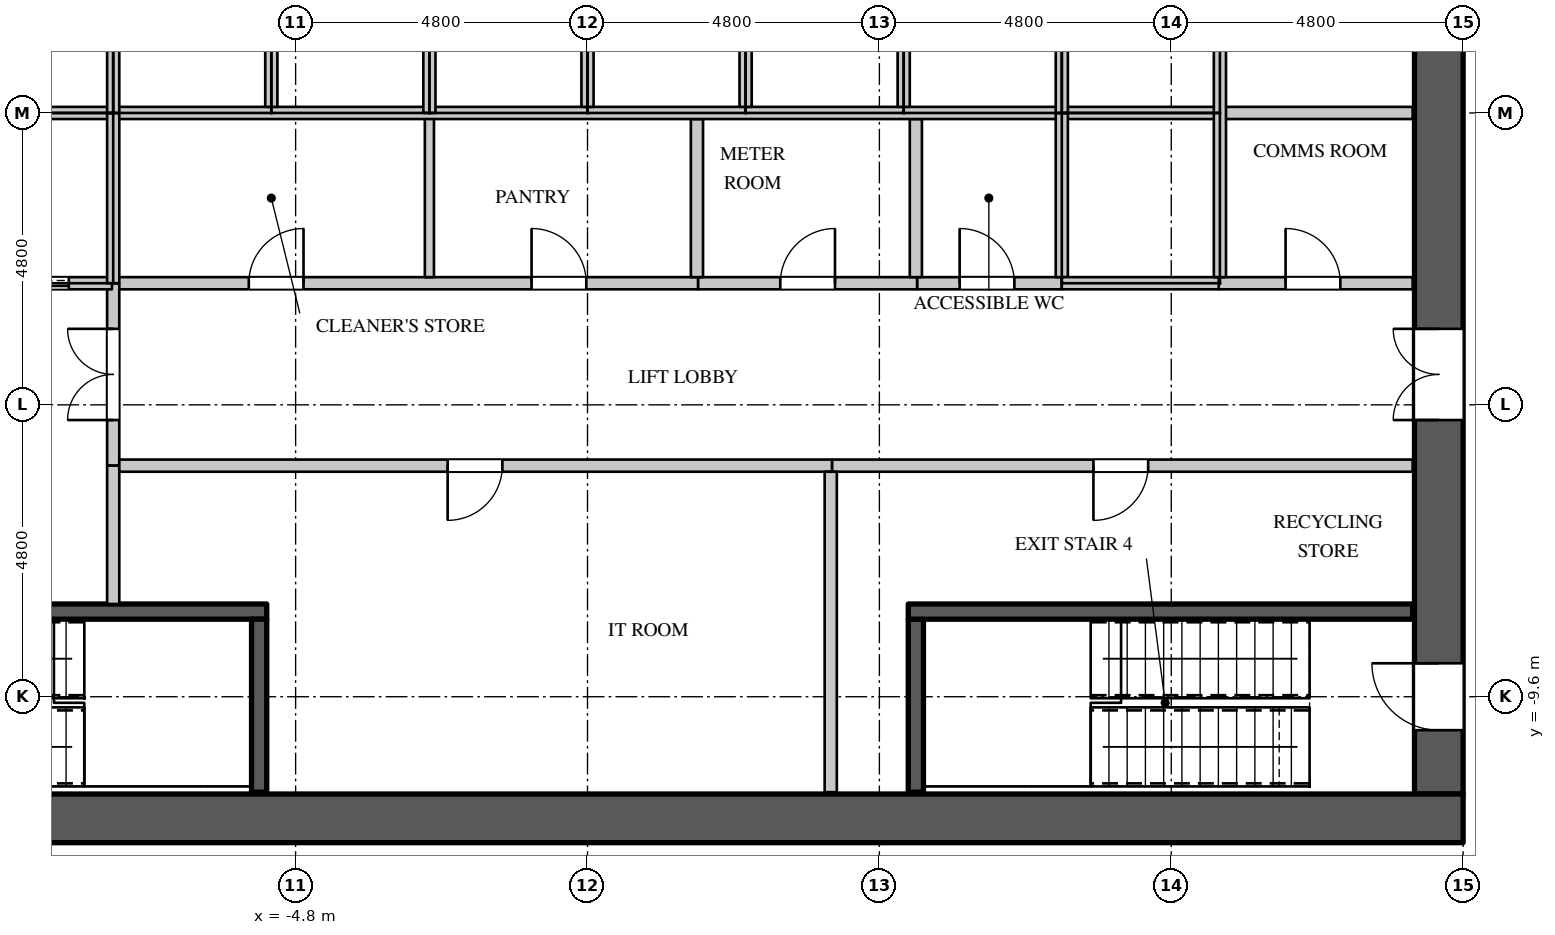
"""IFC4 building model, lengths in metres.
Left out: names, types, materials, properties, quantities, classifications, styles, units other than length and angle.
Written with IfcOpenShell. Run it as: python <this file> out.ifc"""

import sys

from ifc_helpers import new_model, si_unit, direction, frame, frame_2d, origin, place, context, subcontext, project, spatial, rectangle, extrude, element, fill, save


model = new_model("IFC4")
c1 = context("Model", 3, precision=1e-05, world=origin(), true_north=direction((0.0, 1.0)))
c2 = subcontext(c1, "Body", "Model", "MODEL_VIEW")
j1 = project(units=[si_unit("LENGTHUNIT", "METRE"), si_unit("PLANEANGLEUNIT", "RADIAN")], contexts=[c1])
p1 = place(None, origin())
s1 = spatial("IfcSite", under=j1, at=p1, CompositionType="ELEMENT")
p2 = place(p1, origin())
s2 = spatial("IfcBuilding", under=s1, at=p2, CompositionType="ELEMENT")
p3 = place(p2, frame((0.0, 0.0, 144.3)))
s3 = spatial("IfcBuildingStorey", under=s2, at=p3, CompositionType="ELEMENT", Elevation=144.3)
p4 = place(p3, frame((-14.4, -11.6, 0.0), z_axis=(0.0, 0.0, 1.0), x_axis=(1.0, 0.0, 0.0)))
e1 = element("IfcWall", 1, at=p4, inside=s3, PredefinedType="SHEAR", context=c2, shape_type="SweptSolid", body=[
    extrude(rectangle(XDim=28.8, YDim=0.8, at=frame_2d((14.4, 0.0))), origin(), (0.0, 0.0, 1.0), 4.2),
])
p5 = place(p3, frame((14.0, -11.2, 0.0), z_axis=(0.0, 0.0, 1.0), x_axis=(0.0, 1.0, 0.0)))
e2 = element("IfcWall", 2, at=p5, inside=s3, PredefinedType="SHEAR", context=c2, shape_type="SweptSolid", body=[
    extrude(rectangle(XDim=22.4, YDim=0.8, at=frame_2d((11.2, 0.0))), origin(), (0.0, 0.0, 1.0), 4.2),
])
p6 = place(p5, frame((20.25, 0.0, 0.0)))
e3 = element("IfcOpeningElement", 3, at=p6, cuts=e2, PredefinedType="OPENING", context=c2, shape_type="SweptSolid", body=[
    extrude(rectangle(XDim=1.1, YDim=2.2, at=frame_2d((0.55, 1.1))), frame((0.0, 0.41, 0.0), z_axis=(0.0, -1.0, 0.0), x_axis=(1.0, 0.0, 0.0)), (0.0, 0.0, 1.0), 0.82),
])
p7 = place(p5, frame((1.05, 0.0, 0.0)))
e4 = element("IfcOpeningElement", 4, at=p7, cuts=e2, PredefinedType="OPENING", context=c2, shape_type="SweptSolid", body=[
    extrude(rectangle(XDim=1.1, YDim=2.2, at=frame_2d((0.55, 1.1))), frame((0.0, 0.41, 0.0), z_axis=(0.0, -1.0, 0.0), x_axis=(1.0, 0.0, 0.0)), (0.0, 0.0, 1.0), 0.82),
])
p8 = place(p5, frame((14.75, 0.0, 0.0)))
e5 = element("IfcOpeningElement", 5, at=p8, cuts=e2, PredefinedType="OPENING", context=c2, shape_type="SweptSolid", body=[
    extrude(rectangle(XDim=1.5, YDim=2.4, at=frame_2d((0.75, 1.2))), frame((0.0, 0.41, 0.0), z_axis=(0.0, -1.0, 0.0), x_axis=(1.0, 0.0, 0.0)), (0.0, 0.0, 1.0), 0.82),
])
p9 = place(p5, frame((6.15, 0.0, 0.0)))
e6 = element("IfcOpeningElement", 6, at=p9, cuts=e2, PredefinedType="OPENING", context=c2, shape_type="SweptSolid", body=[
    extrude(rectangle(XDim=1.5, YDim=2.4, at=frame_2d((0.75, 1.2))), frame((0.0, 0.41, 0.0), z_axis=(0.0, -1.0, 0.0), x_axis=(1.0, 0.0, 0.0)), (0.0, 0.0, 1.0), 0.82),
])
p10 = place(p3, frame((-7.82, -2.8, 0.0), z_axis=(0.0, 0.0, 1.0), x_axis=(1.0, 0.0, 0.0)))
e7 = element("IfcWall", 7, at=p10, inside=s3, PredefinedType="PARTITIONING", context=c2, shape_type="SweptSolid", body=[
    extrude(rectangle(XDim=9.64, YDim=0.2, at=frame_2d((4.82, 0.0))), origin(), (0.0, 0.0, 1.0), 3.798),
])
p11 = place(p10, frame((2.25, 0.0, 0.0)))
e8 = element("IfcOpeningElement", 8, at=p11, cuts=e7, PredefinedType="OPENING", context=c2, shape_type="SweptSolid", body=[
    extrude(rectangle(XDim=0.9, YDim=2.2, at=frame_2d((0.45, 1.1))), frame((0.0, 0.11, 0.0), z_axis=(0.0, -1.0, 0.0), x_axis=(1.0, 0.0, 0.0)), (0.0, 0.0, 1.0), 0.22),
])
p12 = place(p10, frame((6.9, 0.0, 0.0)))
e9 = element("IfcOpeningElement", 9, at=p12, cuts=e7, PredefinedType="OPENING", context=c2, shape_type="SweptSolid", body=[
    extrude(rectangle(XDim=0.9, YDim=2.2, at=frame_2d((0.45, 1.1))), frame((0.0, 0.11, 0.0), z_axis=(0.0, -1.0, 0.0), x_axis=(1.0, 0.0, 0.0)), (0.0, 0.0, 1.0), 0.22),
])
p13 = place(p3, frame((-7.8, -5.8, 0.0), z_axis=(0.0, 0.0, 1.0), x_axis=(0.0, 1.0, 0.0)))
e10 = element("IfcWall", 10, at=p13, inside=s3, PredefinedType="PARTITIONING", context=c2, shape_type="SweptSolid", body=[
    extrude(rectangle(XDim=3.0, YDim=0.2, at=frame_2d((1.5, 0.0))), origin(), (0.0, 0.0, 1.0), 3.798),
])
p14 = place(p13, frame((0.75, 0.0, 0.0)))
e11 = element("IfcOpeningElement", 11, at=p14, cuts=e10, PredefinedType="OPENING", context=c2, shape_type="SweptSolid", body=[
    extrude(rectangle(XDim=1.5, YDim=2.4, at=frame_2d((0.75, 1.2))), frame((0.0, 0.11, 0.0), z_axis=(0.0, -1.0, 0.0), x_axis=(1.0, 0.0, 0.0)), (0.0, 0.0, 1.0), 0.22),
])
p15 = place(p3, frame((4.02, -5.8, 0.0), z_axis=(0.0, 0.0, 1.0), x_axis=(1.0, 0.0, 0.0)))
e12 = element("IfcWall", 12, at=p15, inside=s3, PredefinedType="PARTITIONING", context=c2, shape_type="SweptSolid", body=[
    extrude(rectangle(XDim=9.55, YDim=0.2, at=frame_2d((4.775, 0.0))), origin(), (0.0, 0.0, 1.0), 3.798),
])
p16 = place(p15, frame((4.3, 0.0, 0.0)))
e13 = element("IfcOpeningElement", 13, at=p16, cuts=e12, PredefinedType="OPENING", context=c2, shape_type="SweptSolid", body=[
    extrude(rectangle(XDim=0.9, YDim=2.2, at=frame_2d((0.45, 1.1))), frame((0.0, 0.11, 0.0), z_axis=(0.0, -1.0, 0.0), x_axis=(1.0, 0.0, 0.0)), (0.0, 0.0, 1.0), 0.22),
])
p17 = place(p3, frame((5.42, -2.8, 0.0), z_axis=(0.0, 0.0, 1.0), x_axis=(1.0, 0.0, 0.0)))
e14 = element("IfcWall", 14, at=p17, inside=s3, PredefinedType="PARTITIONING", context=c2, shape_type="SweptSolid", body=[
    extrude(rectangle(XDim=2.38, YDim=0.2, at=frame_2d((1.19, 0.0))), origin(), (0.0, 0.0, 1.0), 3.798),
])
p18 = place(p17, frame((0.7, 0.0, 0.0)))
e15 = element("IfcOpeningElement", 15, at=p18, cuts=e14, PredefinedType="OPENING", context=c2, shape_type="SweptSolid", body=[
    extrude(rectangle(XDim=0.9, YDim=2.2, at=frame_2d((0.45, 1.1))), frame((0.0, 0.11, 0.0), z_axis=(0.0, -1.0, 0.0), x_axis=(1.0, 0.0, 0.0)), (0.0, 0.0, 1.0), 0.22),
])
p19 = place(p3, frame((-2.6, -2.7, 0.0), z_axis=(0.0, 0.0, 1.0), x_axis=(0.0, 1.0, 0.0)))
e16 = element("IfcWall", 16, at=p19, inside=s3, PredefinedType="PARTITIONING", context=c2, shape_type="SweptSolid", body=[
    extrude(rectangle(XDim=2.7, YDim=0.15, at=frame_2d((1.35, 0.0))), origin(), (0.0, 0.0, 1.0), 3.798),
])
p20 = place(p3, frame((-7.8, -8.075, 0.0), z_axis=(0.0, 0.0, 1.0), x_axis=(0.0, 1.0, 0.0)))
e17 = element("IfcWall", 17, at=p20, inside=s3, PredefinedType="PARTITIONING", context=c2, shape_type="SweptSolid", body=[
    extrude(rectangle(XDim=2.275, YDim=0.2, at=frame_2d((1.137, 0.0))), origin(), (0.0, 0.0, 1.0), 3.798),
])
p21 = place(p3, frame((-7.7, -5.8, 0.0), z_axis=(0.0, 0.0, 1.0), x_axis=(1.0, 0.0, 0.0)))
e18 = element("IfcWall", 18, at=p21, inside=s3, PredefinedType="PARTITIONING", context=c2, shape_type="SweptSolid", body=[
    extrude(rectangle(XDim=11.72, YDim=0.2, at=frame_2d((5.86, 0.0))), origin(), (0.0, 0.0, 1.0), 3.798),
])
p22 = place(p21, frame((5.4, 0.0, 0.0)))
e19 = element("IfcOpeningElement", 19, at=p22, cuts=e18, PredefinedType="OPENING", context=c2, shape_type="SweptSolid", body=[
    extrude(rectangle(XDim=0.9, YDim=2.2, at=frame_2d((0.45, 1.1))), frame((0.0, 0.11, 0.0), z_axis=(0.0, -1.0, 0.0), x_axis=(1.0, 0.0, 0.0)), (0.0, 0.0, 1.0), 0.22),
])
p23 = place(p3, frame((1.82, -2.8, 0.0), z_axis=(0.0, 0.0, 1.0), x_axis=(1.0, 0.0, 0.0)))
e20 = element("IfcWall", 20, at=p23, inside=s3, PredefinedType="PARTITIONING", context=c2, shape_type="SweptSolid", body=[
    extrude(rectangle(XDim=3.6, YDim=0.2, at=frame_2d((1.8, 0.0))), origin(), (0.0, 0.0, 1.0), 3.798),
])
p24 = place(p23, frame((1.35, 0.0, 0.0)))
e21 = element("IfcOpeningElement", 21, at=p24, cuts=e20, PredefinedType="OPENING", context=c2, shape_type="SweptSolid", body=[
    extrude(rectangle(XDim=0.9, YDim=2.2, at=frame_2d((0.45, 1.1))), frame((0.0, 0.11, 0.0), z_axis=(0.0, -1.0, 0.0), x_axis=(1.0, 0.0, 0.0)), (0.0, 0.0, 1.0), 0.22),
])
p25 = place(p3, frame((1.8, -2.7, 0.0), z_axis=(0.0, 0.0, 1.0), x_axis=(0.0, 1.0, 0.0)))
e22 = element("IfcWall", 22, at=p25, inside=s3, PredefinedType="PARTITIONING", context=c2, shape_type="SweptSolid", body=[
    extrude(rectangle(XDim=2.6, YDim=0.2, at=frame_2d((1.3, 0.0))), origin(), (0.0, 0.0, 1.0), 3.798),
])
p26 = place(p3, frame((4.0, -11.17, 0.0), z_axis=(0.0, 0.0, 1.0), x_axis=(0.0, 1.0, 0.0)))
e23 = element("IfcWall", 23, at=p26, inside=s3, PredefinedType="PARTITIONING", context=c2, shape_type="SweptSolid", body=[
    extrude(rectangle(XDim=5.27, YDim=0.2, at=frame_2d((2.635, 0.0))), origin(), (0.0, 0.0, 1.0), 3.798),
])
p27 = place(p3, frame((5.4, -2.7, 0.0), z_axis=(0.0, 0.0, 1.0), x_axis=(0.0, 1.0, 0.0)))
e24 = element("IfcWall", 24, at=p27, inside=s3, PredefinedType="PARTITIONING", context=c2, shape_type="SweptSolid", body=[
    extrude(rectangle(XDim=2.6, YDim=0.2, at=frame_2d((1.3, 0.0))), origin(), (0.0, 0.0, 1.0), 3.798),
])
p28 = place(p3, frame((10.38, -2.8, 0.0), z_axis=(0.0, 0.0, 1.0), x_axis=(1.0, 0.0, 0.0)))
e25 = element("IfcWall", 25, at=p28, inside=s3, PredefinedType="PARTITIONING", context=c2, shape_type="SweptSolid", body=[
    extrude(rectangle(XDim=3.19, YDim=0.2, at=frame_2d((1.595, 0.0))), origin(), (0.0, 0.0, 1.0), 3.798),
])
p29 = place(p28, frame((1.1, 0.0, 0.0)))
e26 = element("IfcOpeningElement", 26, at=p29, cuts=e25, PredefinedType="OPENING", context=c2, shape_type="SweptSolid", body=[
    extrude(rectangle(XDim=0.9, YDim=2.2, at=frame_2d((0.45, 1.1))), frame((0.0, 0.11, 0.0), z_axis=(0.0, -1.0, 0.0), x_axis=(1.0, 0.0, 0.0)), (0.0, 0.0, 1.0), 0.22),
])
p30 = place(p3, frame((10.4, 0.0, 0.0), z_axis=(0.0, 0.0, 1.0), x_axis=(1.0, 0.0, 0.0)))
e27 = element("IfcWall", 27, at=p30, inside=s3, PredefinedType="PARTITIONING", context=c2, shape_type="SweptSolid", body=[
    extrude(rectangle(XDim=3.17, YDim=0.2, at=frame_2d((1.585, 0.0))), origin(), (0.0, 0.0, 1.0), 3.798),
])
p31 = place(p3, frame((-13.57, 0.0, 0.0), z_axis=(0.0, 0.0, 1.0), x_axis=(1.0, 0.0, 0.0)))
e28 = element("IfcWall", 28, at=p31, inside=s3, PredefinedType="PARTITIONING", context=c2, shape_type="SweptSolid", body=[
    extrude(rectangle(XDim=23.97, YDim=0.2, at=frame_2d((11.985, 0.0))), origin(), (0.0, 0.0, 1.0), 3.798),
])
p32 = place(p3, frame((-10.38, -2.8, 0.0), z_axis=(0.0, 0.0, 1.0), x_axis=(1.0, 0.0, 0.0)))
e29 = element("IfcWall", 29, at=p32, inside=s3, PredefinedType="PARTITIONING", context=c2, shape_type="SweptSolid", body=[
    extrude(rectangle(XDim=2.56, YDim=0.2, at=frame_2d((1.28, 0.0))), origin(), (0.0, 0.0, 1.0), 3.798),
])
p33 = place(p32, frame((0.75, 0.0, 0.0)))
e30 = element("IfcOpeningElement", 30, at=p33, cuts=e29, PredefinedType="OPENING", context=c2, shape_type="SweptSolid", body=[
    extrude(rectangle(XDim=1.1, YDim=2.2, at=frame_2d((0.55, 1.1))), frame((0.0, 0.11, 0.0), z_axis=(0.0, -1.0, 0.0), x_axis=(1.0, 0.0, 0.0)), (0.0, 0.0, 1.0), 0.22),
])
for number, where, z_axis, x_axis in (
    (31, (-7.8, -2.8, 0.0), (0.0, 0.0, 1.0), (0.0, 1.0, 0.0)),
    (32, (-7.8, 0.0, 0.0), (0.0, 0.0, 1.0), (0.0, 1.0, 0.0)),
):
    element("IfcWall", number, at=place(p3, frame(where, z_axis=z_axis, x_axis=x_axis)), inside=s3, PredefinedType="PARTITIONING", context=c2, shape_type="SweptSolid", body=[
        extrude(rectangle(XDim=2.8, YDim=0.2, at=frame_2d((1.4, 0.0))), origin(), (0.0, 0.0, 1.0), 3.798),
    ])
p34 = place(p3, frame((-5.2, 0.1, 0.0), z_axis=(0.0, 0.0, 1.0), x_axis=(0.0, 1.0, 0.0)))
e33 = element("IfcWall", 33, at=p34, inside=s3, PredefinedType="PARTITIONING", context=c2, shape_type="SweptSolid", body=[
    extrude(rectangle(XDim=2.6, YDim=0.2, at=frame_2d((1.3, 0.0))), origin(), (0.0, 0.0, 1.0), 3.798),
])
p35 = place(p3, frame((-2.6, 0.0, 0.0), z_axis=(0.0, 0.0, 1.0), x_axis=(0.0, 1.0, 0.0)))
e34 = element("IfcWall", 34, at=p35, inside=s3, PredefinedType="PARTITIONING", context=c2, shape_type="SweptSolid", body=[
    extrude(rectangle(XDim=2.7, YDim=0.2, at=frame_2d((1.35, 0.0))), origin(), (0.0, 0.0, 1.0), 3.798),
])
for number, where, z_axis, x_axis in (
    (35, (0.0, 0.1, 0.0), (0.0, 0.0, 1.0), (0.0, 1.0, 0.0)),
    (36, (2.6, 0.1, 0.0), (0.0, 0.0, 1.0), (0.0, 1.0, 0.0)),
    (37, (5.2, 0.1, 0.0), (0.0, 0.0, 1.0), (0.0, 1.0, 0.0)),
):
    element("IfcWall", number, at=place(p3, frame(where, z_axis=z_axis, x_axis=x_axis)), inside=s3, PredefinedType="PARTITIONING", context=c2, shape_type="SweptSolid", body=[
        extrude(rectangle(XDim=2.6, YDim=0.2, at=frame_2d((1.3, 0.0))), origin(), (0.0, 0.0, 1.0), 3.798),
    ])
p36 = place(p3, frame((7.8, -2.7, 0.0), z_axis=(0.0, 0.0, 1.0), x_axis=(0.0, 1.0, 0.0)))
e38 = element("IfcWall", 38, at=p36, inside=s3, PredefinedType="PARTITIONING", context=c2, shape_type="SweptSolid", body=[
    extrude(rectangle(XDim=2.7, YDim=0.2, at=frame_2d((1.35, 0.0))), origin(), (0.0, 0.0, 1.0), 3.798),
])
p37 = place(p3, frame((7.8, -2.8, 0.0), z_axis=(0.0, 0.0, 1.0), x_axis=(1.0, 0.0, 0.0)))
e39 = element("IfcWall", 39, at=p37, inside=s3, PredefinedType="PARTITIONING", context=c2, shape_type="SweptSolid", body=[
    extrude(rectangle(XDim=2.58, YDim=0.2, at=frame_2d((1.29, 0.0))), origin(), (0.0, 0.0, 1.0), 3.798),
])
p38 = place(p3, frame((7.8, 0.0, 0.0), z_axis=(0.0, 0.0, 1.0), x_axis=(0.0, 1.0, 0.0)))
e40 = element("IfcWall", 40, at=p38, inside=s3, PredefinedType="PARTITIONING", context=c2, shape_type="SweptSolid", body=[
    extrude(rectangle(XDim=2.7, YDim=0.2, at=frame_2d((1.35, 0.0))), origin(), (0.0, 0.0, 1.0), 3.798),
])
p39 = place(p3, frame((10.4, -2.7, 0.0), z_axis=(0.0, 0.0, 1.0), x_axis=(0.0, 1.0, 0.0)))
e41 = element("IfcWall", 41, at=p39, inside=s3, PredefinedType="PARTITIONING", context=c2, shape_type="SweptSolid", body=[
    extrude(rectangle(XDim=5.4, YDim=0.2, at=frame_2d((2.7, 0.0))), origin(), (0.0, 0.0, 1.0), 3.798),
])
p40 = place(p3, frame((-13.57, -8.2, 0.0), z_axis=(0.0, 0.0, 1.0), x_axis=(1.0, 0.0, 0.0)))
e42 = element("IfcWall", 42, at=p40, inside=s3, PredefinedType="SHEAR", context=c2, shape_type="SweptSolid", body=[
    extrude(rectangle(XDim=8.295, YDim=0.25, at=frame_2d((4.147, 0.0))), origin(), (0.0, 0.0, 1.0), 3.798),
])
p41 = place(p40, frame((0.15, 0.0, 0.0)))
e43 = element("IfcOpeningElement", 43, at=p41, cuts=e42, PredefinedType="OPENING", context=c2, shape_type="SweptSolid", body=[
    extrude(rectangle(XDim=1.1, YDim=2.2, at=frame_2d((0.55, 1.1))), frame((0.0, 0.135, 0.0), z_axis=(0.0, -1.0, 0.0), x_axis=(1.0, 0.0, 0.0)), (0.0, 0.0, 1.0), 0.27),
])
for number, where, z_axis, x_axis in (
    (44, (-5.4, -11.17, 0.0), (0.0, 0.0, 1.0), (0.0, 1.0, 0.0)),
    (45, (5.4, -11.17, 0.0), (0.0, 0.0, 1.0), (0.0, 1.0, 0.0)),
):
    element("IfcWall", number, at=place(p3, frame(where, z_axis=z_axis, x_axis=x_axis)), inside=s3, PredefinedType="SHEAR", context=c2, shape_type="SweptSolid", body=[
        extrude(rectangle(XDim=2.845, YDim=0.25, at=frame_2d((1.422, 0.0))), origin(), (0.0, 0.0, 1.0), 3.798),
    ])
p42 = place(p3, frame((5.275, -8.2, 0.0), z_axis=(0.0, 0.0, 1.0), x_axis=(1.0, 0.0, 0.0)))
e46 = element("IfcWall", 46, at=p42, inside=s3, PredefinedType="SHEAR", context=c2, shape_type="SweptSolid", body=[
    extrude(rectangle(XDim=8.295, YDim=0.25, at=frame_2d((4.147, 0.0))), origin(), (0.0, 0.0, 1.0), 3.798),
])
p43 = place(p29, origin())
e47 = element("IfcDoor", 47, at=p43, inside=s3, OperationType="SINGLE_SWING_LEFT", PredefinedType="DOOR", context=c2, shape_type="SweptSolid", body=[
    extrude(rectangle(XDim=0.9, YDim=2.2, at=frame_2d((0.45, 1.1))), frame((0.0, 0.025, 0.0), z_axis=(0.0, -1.0, 0.0), x_axis=(1.0, 0.0, 0.0)), (0.0, 0.0, 1.0), 0.05),
])
fill(e26, e47)
p44 = place(p22, origin())
e48 = element("IfcDoor", 48, at=p44, inside=s3, OperationType="SINGLE_SWING_RIGHT", PredefinedType="DOOR", context=c2, shape_type="SweptSolid", body=[
    extrude(rectangle(XDim=0.9, YDim=2.2, at=frame_2d((0.45, 1.1))), frame((0.0, 0.025, 0.0), z_axis=(0.0, -1.0, 0.0), x_axis=(1.0, 0.0, 0.0)), (0.0, 0.0, 1.0), 0.05),
])
fill(e19, e48)
p45 = place(p16, origin())
e49 = element("IfcDoor", 49, at=p45, inside=s3, OperationType="SINGLE_SWING_RIGHT", PredefinedType="DOOR", context=c2, shape_type="SweptSolid", body=[
    extrude(rectangle(XDim=0.9, YDim=2.2, at=frame_2d((0.45, 1.1))), frame((0.0, 0.025, 0.0), z_axis=(0.0, -1.0, 0.0), x_axis=(1.0, 0.0, 0.0)), (0.0, 0.0, 1.0), 0.05),
])
fill(e13, e49)
p46 = place(p11, origin())
e50 = element("IfcDoor", 50, at=p46, inside=s3, OperationType="SINGLE_SWING_RIGHT", PredefinedType="DOOR", context=c2, shape_type="SweptSolid", body=[
    extrude(rectangle(XDim=0.9, YDim=2.2, at=frame_2d((0.45, 1.1))), frame((0.0, 0.025, 0.0), z_axis=(0.0, -1.0, 0.0), x_axis=(1.0, 0.0, 0.0)), (0.0, 0.0, 1.0), 0.05),
])
fill(e8, e50)
p47 = place(p12, origin())
e51 = element("IfcDoor", 51, at=p47, inside=s3, OperationType="SINGLE_SWING_LEFT", PredefinedType="DOOR", context=c2, shape_type="SweptSolid", body=[
    extrude(rectangle(XDim=0.9, YDim=2.2, at=frame_2d((0.45, 1.1))), frame((0.0, 0.025, 0.0), z_axis=(0.0, -1.0, 0.0), x_axis=(1.0, 0.0, 0.0)), (0.0, 0.0, 1.0), 0.05),
])
fill(e9, e51)
p48 = place(p24, origin())
e52 = element("IfcDoor", 52, at=p48, inside=s3, OperationType="SINGLE_SWING_RIGHT", PredefinedType="DOOR", context=c2, shape_type="SweptSolid", body=[
    extrude(rectangle(XDim=0.9, YDim=2.2, at=frame_2d((0.45, 1.1))), frame((0.0, 0.025, 0.0), z_axis=(0.0, -1.0, 0.0), x_axis=(1.0, 0.0, 0.0)), (0.0, 0.0, 1.0), 0.05),
])
fill(e21, e52)
p49 = place(p18, origin())
e53 = element("IfcDoor", 53, at=p49, inside=s3, OperationType="SINGLE_SWING_LEFT", PredefinedType="DOOR", context=c2, shape_type="SweptSolid", body=[
    extrude(rectangle(XDim=0.9, YDim=2.2, at=frame_2d((0.45, 1.1))), frame((0.0, 0.025, 0.0), z_axis=(0.0, -1.0, 0.0), x_axis=(1.0, 0.0, 0.0)), (0.0, 0.0, 1.0), 0.05),
])
fill(e15, e53)
p50 = place(p33, origin())
e54 = element("IfcDoor", 54, at=p50, inside=s3, OperationType="DOUBLE_DOOR_SLIDING", PredefinedType="DOOR", context=c2, shape_type="SweptSolid", body=[
    extrude(rectangle(XDim=1.1, YDim=2.2, at=frame_2d((0.55, 1.1))), frame((0.0, 0.025, 0.0), z_axis=(0.0, -1.0, 0.0), x_axis=(1.0, 0.0, 0.0)), (0.0, 0.0, 1.0), 0.05),
])
fill(e30, e54)
p51 = place(p14, origin())
e55 = element("IfcDoor", 55, at=p51, inside=s3, OperationType="DOUBLE_DOOR_SINGLE_SWING", PredefinedType="DOOR", context=c2, shape_type="SweptSolid", body=[
    extrude(rectangle(XDim=1.5, YDim=2.4, at=frame_2d((0.75, 1.2))), frame((0.0, 0.025, 0.0), z_axis=(0.0, -1.0, 0.0), x_axis=(1.0, 0.0, 0.0)), (0.0, 0.0, 1.0), 0.05),
])
fill(e11, e55)
p52 = place(p7, origin())
e56 = element("IfcDoor", 56, at=p52, inside=s3, OperationType="SINGLE_SWING_RIGHT", PredefinedType="DOOR", context=c2, shape_type="SweptSolid", body=[
    extrude(rectangle(XDim=1.1, YDim=2.2, at=frame_2d((0.55, 1.1))), frame((0.0, 0.395, 0.0), z_axis=(0.0, -1.0, 0.0), x_axis=(1.0, 0.0, 0.0)), (0.0, 0.0, 1.0), 0.05),
])
fill(e4, e56)
p53 = place(p9, origin())
e57 = element("IfcDoor", 57, at=p53, inside=s3, OperationType="DOUBLE_DOOR_SINGLE_SWING", PredefinedType="DOOR", context=c2, shape_type="SweptSolid", body=[
    extrude(rectangle(XDim=1.5, YDim=2.4, at=frame_2d((0.75, 1.2))), frame((0.0, 0.395, 0.0), z_axis=(0.0, -1.0, 0.0), x_axis=(1.0, 0.0, 0.0)), (0.0, 0.0, 1.0), 0.05),
])
fill(e6, e57)
save(model, sys.argv[1])
